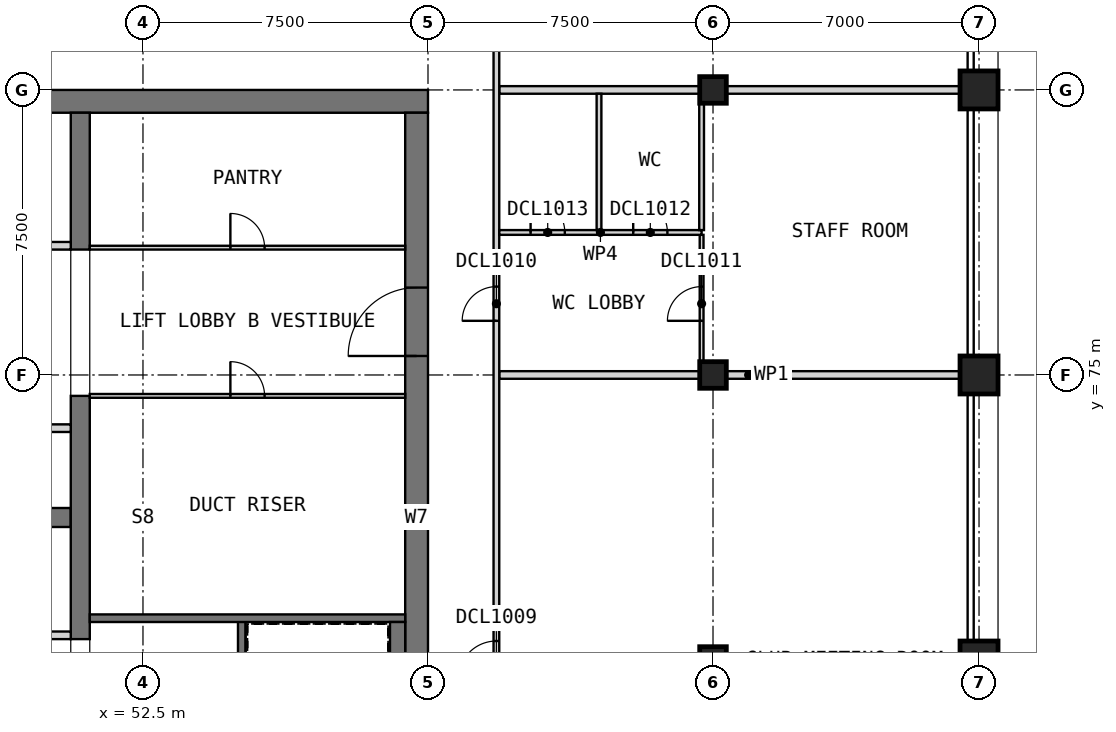
"""IFC4 building model, lengths in metres.
Left out: names, types, materials, properties, quantities, classifications, styles, units other than length and angle.
Written with IfcOpenShell. Run it as: python <this file> out.ifc"""

import sys

from ifc_helpers import new_model, si_unit, direction, frame, frame_2d, origin, origin_2d, place, context, subcontext, project, spatial, rectangle, extrude, element, fill, save


model = new_model("IFC4")
c1 = context("Model", 3, precision=1e-05, world=origin(), true_north=direction((0.0, 1.0)))
c2 = subcontext(c1, "Body", "Model", "MODEL_VIEW")
j1 = project(units=[si_unit("LENGTHUNIT", "METRE"), si_unit("PLANEANGLEUNIT", "RADIAN")], contexts=[c1])
p1 = place(None, origin())
s1 = spatial("IfcSite", under=j1, at=p1, CompositionType="ELEMENT")
p2 = place(p1, origin())
s2 = spatial("IfcBuilding", under=s1, at=p2, CompositionType="ELEMENT")
p3 = place(p2, frame((0.0, 0.0, 287.2)))
s3 = spatial("IfcBuildingStorey", under=s2, at=p3, CompositionType="ELEMENT", Elevation=287.2)
for number, where, z_axis, x_axis in (
    (1, (67.5, 67.5, 0.0), (0.0, 0.0, 1.0), (1.0, 0.0, 0.0)),
    (2, (67.5, 75.0, 0.0), (0.0, 0.0, 1.0), (1.0, 0.0, 0.0)),
    (3, (67.5, 82.5, 0.0), (0.0, 0.0, 1.0), (1.0, 0.0, 0.0)),
):
    element("IfcColumn", number, at=place(p3, frame(where, z_axis=z_axis, x_axis=x_axis)), inside=s3, PredefinedType="COLUMN", context=c2, shape_type="SweptSolid", body=[
        extrude(rectangle(XDim=0.7, YDim=0.7, at=origin_2d()), origin(), (0.0, 0.0, 1.0), 5.0),
    ])
for number, where, z_axis, x_axis in (
    (4, (74.5, 67.5, 0.0), (0.0, 0.0, 1.0), (1.0, 0.0, 0.0)),
    (5, (74.5, 75.0, 0.0), (0.0, 0.0, 1.0), (1.0, 0.0, 0.0)),
    (6, (74.5, 82.5, 0.0), (0.0, 0.0, 1.0), (1.0, 0.0, 0.0)),
):
    element("IfcColumn", number, at=place(p3, frame(where, z_axis=z_axis, x_axis=x_axis)), inside=s3, PredefinedType="COLUMN", context=c2, shape_type="SweptSolid", body=[
        extrude(rectangle(XDim=1.0, YDim=1.0, at=origin_2d()), origin(), (0.0, 0.0, 1.0), 5.0),
    ])
p4 = place(p3, frame((30.0, 82.2, 0.0), z_axis=(0.0, 0.0, 1.0), x_axis=(1.0, 0.0, 0.0)))
e7 = element("IfcWall", 7, at=p4, inside=s3, PredefinedType="SHEAR", context=c2, shape_type="SweptSolid", body=[
    extrude(rectangle(XDim=30.0, YDim=0.6, at=frame_2d((15.0, 0.0))), origin(), (0.0, 0.0, 1.0), 5.0),
])
p5 = place(p3, frame((59.7, 60.6, 0.0), z_axis=(0.0, 0.0, 1.0), x_axis=(0.0, 1.0, 0.0)))
e8 = element("IfcWall", 8, at=p5, inside=s3, PredefinedType="SHEAR", context=c2, shape_type="SweptSolid", body=[
    extrude(rectangle(XDim=21.3, YDim=0.6, at=frame_2d((10.65, 0.0))), origin(), (0.0, 0.0, 1.0), 5.0),
])
p6 = place(p5, frame((14.9, 0.0, 0.0)))
e9 = element("IfcOpeningElement", 9, at=p6, cuts=e8, PredefinedType="OPENING", context=c2, shape_type="SweptSolid", body=[
    extrude(rectangle(XDim=1.8, YDim=2.1, at=frame_2d((0.9, 1.05))), frame((0.0, 0.31, 0.0), z_axis=(0.0, -1.0, 0.0), x_axis=(1.0, 0.0, 0.0)), (0.0, 0.0, 1.0), 0.62),
])
p7 = place(p3, frame((35.0, 71.25, 0.0), z_axis=(0.0, 0.0, 1.0), x_axis=(1.0, 0.0, 0.0)))
e10 = element("IfcWall", 10, at=p7, inside=s3, PredefinedType="SHEAR", context=c2, shape_type="SweptSolid", body=[
    extrude(rectangle(XDim=15.6, YDim=0.5, at=frame_2d((7.8, 0.0))), origin(), (0.0, 0.0, 1.0), 5.0),
])
p8 = place(p3, frame((50.85, 68.05, 0.0), z_axis=(0.0, 0.0, 1.0), x_axis=(0.0, 1.0, 0.0)))
e11 = element("IfcWall", 11, at=p8, inside=s3, PredefinedType="SHEAR", context=c2, shape_type="SweptSolid", body=[
    extrude(rectangle(XDim=6.4, YDim=0.5, at=frame_2d((3.2, 0.0))), origin(), (0.0, 0.0, 1.0), 5.0),
])
p9 = place(p3, frame((50.85, 78.3, 0.0), z_axis=(0.0, 0.0, 1.0), x_axis=(0.0, 1.0, 0.0)))
e12 = element("IfcWall", 12, at=p9, inside=s3, PredefinedType="SHEAR", context=c2, shape_type="SweptSolid", body=[
    extrude(rectangle(XDim=3.6, YDim=0.5, at=frame_2d((1.8, 0.0))), origin(), (0.0, 0.0, 1.0), 5.0),
])
p10 = place(p3, frame((35.0, 68.15, 0.0), z_axis=(0.0, 0.0, 1.0), x_axis=(1.0, 0.0, 0.0)))
e13 = element("IfcWall", 13, at=p10, inside=s3, PredefinedType="PARTITIONING", context=c2, shape_type="SweptSolid", body=[
    extrude(rectangle(XDim=15.6, YDim=0.2, at=frame_2d((7.8, 0.0))), origin(), (0.0, 0.0, 1.0), 4.7),
])
p11 = place(p10, frame((2.15, 0.0, 0.0)))
e14 = element("IfcOpeningElement", 14, at=p11, cuts=e13, PredefinedType="OPENING", context=c2, shape_type="SweptSolid", body=[
    extrude(rectangle(XDim=0.9, YDim=2.1, at=frame_2d((0.45, 1.05))), frame((0.0, 0.11, 0.0), z_axis=(0.0, -1.0, 0.0), x_axis=(1.0, 0.0, 0.0)), (0.0, 0.0, 1.0), 0.22),
])
p12 = place(p10, frame((7.35, 0.0, 0.0)))
e15 = element("IfcOpeningElement", 15, at=p12, cuts=e13, PredefinedType="OPENING", context=c2, shape_type="SweptSolid", body=[
    extrude(rectangle(XDim=0.9, YDim=2.1, at=frame_2d((0.45, 1.05))), frame((0.0, 0.11, 0.0), z_axis=(0.0, -1.0, 0.0), x_axis=(1.0, 0.0, 0.0)), (0.0, 0.0, 1.0), 0.22),
])
p13 = place(p10, frame((12.55, 0.0, 0.0)))
e16 = element("IfcOpeningElement", 16, at=p13, cuts=e13, PredefinedType="OPENING", context=c2, shape_type="SweptSolid", body=[
    extrude(rectangle(XDim=0.9, YDim=2.1, at=frame_2d((0.45, 1.05))), frame((0.0, 0.11, 0.0), z_axis=(0.0, -1.0, 0.0), x_axis=(1.0, 0.0, 0.0)), (0.0, 0.0, 1.0), 0.22),
])
p14 = place(p3, frame((35.0, 73.6, 0.0), z_axis=(0.0, 0.0, 1.0), x_axis=(1.0, 0.0, 0.0)))
e17 = element("IfcWall", 17, at=p14, inside=s3, PredefinedType="SOLIDWALL", context=c2, shape_type="SweptSolid", body=[
    extrude(rectangle(XDim=15.6, YDim=0.2, at=frame_2d((7.8, 0.0))), origin(), (0.0, 0.0, 1.0), 5.0),
])
p15 = place(p14, frame((0.75, 0.0, 0.0)))
e18 = element("IfcOpeningElement", 18, at=p15, cuts=e17, PredefinedType="OPENING", context=c2, shape_type="SweptSolid", body=[
    extrude(rectangle(XDim=1.1, YDim=2.1, at=frame_2d((0.55, 1.05))), frame((0.0, 0.11, 0.0), z_axis=(0.0, -1.0, 0.0), x_axis=(1.0, 0.0, 0.0)), (0.0, 0.0, 1.0), 0.22),
])
p16 = place(p14, frame((3.35, 0.0, 0.0)))
e19 = element("IfcOpeningElement", 19, at=p16, cuts=e17, PredefinedType="OPENING", context=c2, shape_type="SweptSolid", body=[
    extrude(rectangle(XDim=1.1, YDim=2.1, at=frame_2d((0.55, 1.05))), frame((0.0, 0.11, 0.0), z_axis=(0.0, -1.0, 0.0), x_axis=(1.0, 0.0, 0.0)), (0.0, 0.0, 1.0), 0.22),
])
p17 = place(p14, frame((5.95, 0.0, 0.0)))
e20 = element("IfcOpeningElement", 20, at=p17, cuts=e17, PredefinedType="OPENING", context=c2, shape_type="SweptSolid", body=[
    extrude(rectangle(XDim=1.1, YDim=2.1, at=frame_2d((0.55, 1.05))), frame((0.0, 0.11, 0.0), z_axis=(0.0, -1.0, 0.0), x_axis=(1.0, 0.0, 0.0)), (0.0, 0.0, 1.0), 0.22),
])
p18 = place(p14, frame((8.55, 0.0, 0.0)))
e21 = element("IfcOpeningElement", 21, at=p18, cuts=e17, PredefinedType="OPENING", context=c2, shape_type="SweptSolid", body=[
    extrude(rectangle(XDim=1.1, YDim=2.1, at=frame_2d((0.55, 1.05))), frame((0.0, 0.11, 0.0), z_axis=(0.0, -1.0, 0.0), x_axis=(1.0, 0.0, 0.0)), (0.0, 0.0, 1.0), 0.22),
])
p19 = place(p14, frame((11.15, 0.0, 0.0)))
e22 = element("IfcOpeningElement", 22, at=p19, cuts=e17, PredefinedType="OPENING", context=c2, shape_type="SweptSolid", body=[
    extrude(rectangle(XDim=1.1, YDim=2.1, at=frame_2d((0.55, 1.05))), frame((0.0, 0.11, 0.0), z_axis=(0.0, -1.0, 0.0), x_axis=(1.0, 0.0, 0.0)), (0.0, 0.0, 1.0), 0.22),
])
p20 = place(p14, frame((13.75, 0.0, 0.0)))
e23 = element("IfcOpeningElement", 23, at=p20, cuts=e17, PredefinedType="OPENING", context=c2, shape_type="SweptSolid", body=[
    extrude(rectangle(XDim=1.1, YDim=2.1, at=frame_2d((0.55, 1.05))), frame((0.0, 0.11, 0.0), z_axis=(0.0, -1.0, 0.0), x_axis=(1.0, 0.0, 0.0)), (0.0, 0.0, 1.0), 0.22),
])
p21 = place(p3, frame((35.0, 78.4, 0.0), z_axis=(0.0, 0.0, 1.0), x_axis=(1.0, 0.0, 0.0)))
e24 = element("IfcWall", 24, at=p21, inside=s3, PredefinedType="SOLIDWALL", context=c2, shape_type="SweptSolid", body=[
    extrude(rectangle(XDim=15.6, YDim=0.2, at=frame_2d((7.8, 0.0))), origin(), (0.0, 0.0, 1.0), 5.0),
])
p22 = place(p21, frame((0.75, 0.0, 0.0)))
e25 = element("IfcOpeningElement", 25, at=p22, cuts=e24, PredefinedType="OPENING", context=c2, shape_type="SweptSolid", body=[
    extrude(rectangle(XDim=1.1, YDim=2.1, at=frame_2d((0.55, 1.05))), frame((0.0, 0.11, 0.0), z_axis=(0.0, -1.0, 0.0), x_axis=(1.0, 0.0, 0.0)), (0.0, 0.0, 1.0), 0.22),
])
p23 = place(p21, frame((3.35, 0.0, 0.0)))
e26 = element("IfcOpeningElement", 26, at=p23, cuts=e24, PredefinedType="OPENING", context=c2, shape_type="SweptSolid", body=[
    extrude(rectangle(XDim=1.1, YDim=2.1, at=frame_2d((0.55, 1.05))), frame((0.0, 0.11, 0.0), z_axis=(0.0, -1.0, 0.0), x_axis=(1.0, 0.0, 0.0)), (0.0, 0.0, 1.0), 0.22),
])
p24 = place(p21, frame((11.15, 0.0, 0.0)))
e27 = element("IfcOpeningElement", 27, at=p24, cuts=e24, PredefinedType="OPENING", context=c2, shape_type="SweptSolid", body=[
    extrude(rectangle(XDim=1.1, YDim=2.1, at=frame_2d((0.55, 1.05))), frame((0.0, 0.11, 0.0), z_axis=(0.0, -1.0, 0.0), x_axis=(1.0, 0.0, 0.0)), (0.0, 0.0, 1.0), 0.22),
])
p25 = place(p21, frame((13.75, 0.0, 0.0)))
e28 = element("IfcOpeningElement", 28, at=p25, cuts=e24, PredefinedType="OPENING", context=c2, shape_type="SweptSolid", body=[
    extrude(rectangle(XDim=1.1, YDim=2.1, at=frame_2d((0.55, 1.05))), frame((0.0, 0.11, 0.0), z_axis=(0.0, -1.0, 0.0), x_axis=(1.0, 0.0, 0.0)), (0.0, 0.0, 1.0), 0.22),
])
p26 = place(p3, frame((55.1, 60.6, 0.0), z_axis=(0.0, 0.0, 1.0), x_axis=(0.0, 1.0, 0.0)))
e29 = element("IfcWall", 29, at=p26, inside=s3, PredefinedType="SOLIDWALL", context=c2, shape_type="SweptSolid", body=[
    extrude(rectangle(XDim=8.0, YDim=0.2, at=frame_2d((4.0, 0.0))), origin(), (0.0, 0.0, 1.0), 4.7),
])
p27 = place(p3, frame((51.1, 68.6, 0.0), z_axis=(0.0, 0.0, 1.0), x_axis=(1.0, 0.0, 0.0)))
e30 = element("IfcWall", 30, at=p27, inside=s3, PredefinedType="SOLIDWALL", context=c2, shape_type="SweptSolid", body=[
    extrude(rectangle(XDim=8.3, YDim=0.2, at=frame_2d((4.15, 0.0))), origin(), (0.0, 0.0, 1.0), 4.7),
])
p28 = place(p3, frame((59.2, 60.6, 0.0), z_axis=(0.0, 0.0, 1.0), x_axis=(0.0, 1.0, 0.0)))
e31 = element("IfcWall", 31, at=p28, inside=s3, PredefinedType="SOLIDWALL", context=c2, shape_type="SweptSolid", body=[
    extrude(rectangle(XDim=7.9, YDim=0.4, at=frame_2d((3.95, 0.0))), origin(), (0.0, 0.0, 1.0), 4.7),
])
p29 = place(p3, frame((51.1, 74.45, 0.0), z_axis=(0.0, 0.0, 1.0), x_axis=(1.0, 0.0, 0.0)))
e32 = element("IfcWall", 32, at=p29, inside=s3, PredefinedType="PARTITIONING", context=c2, shape_type="SweptSolid", body=[
    extrude(rectangle(XDim=8.3, YDim=0.1, at=frame_2d((4.15, 0.0))), origin(), (0.0, 0.0, 1.0), 4.7),
])
p30 = place(p29, frame((3.7, 0.0, 0.0)))
e33 = element("IfcOpeningElement", 33, at=p30, cuts=e32, PredefinedType="OPENING", context=c2, shape_type="SweptSolid", body=[
    extrude(rectangle(XDim=0.9, YDim=2.1, at=frame_2d((0.45, 1.05))), frame((0.0, 0.06, 0.0), z_axis=(0.0, -1.0, 0.0), x_axis=(1.0, 0.0, 0.0)), (0.0, 0.0, 1.0), 0.12),
])
p31 = place(p3, frame((51.1, 78.35, 0.0), z_axis=(0.0, 0.0, 1.0), x_axis=(1.0, 0.0, 0.0)))
e34 = element("IfcWall", 34, at=p31, inside=s3, PredefinedType="PARTITIONING", context=c2, shape_type="SweptSolid", body=[
    extrude(rectangle(XDim=8.3, YDim=0.1, at=frame_2d((4.15, 0.0))), origin(), (0.0, 0.0, 1.0), 4.7),
])
p32 = place(p31, frame((3.7, 0.0, 0.0)))
e35 = element("IfcOpeningElement", 35, at=p32, cuts=e34, PredefinedType="OPENING", context=c2, shape_type="SweptSolid", body=[
    extrude(rectangle(XDim=0.9, YDim=2.1, at=frame_2d((0.45, 1.05))), frame((0.0, 0.06, 0.0), z_axis=(0.0, -1.0, 0.0), x_axis=(1.0, 0.0, 0.0)), (0.0, 0.0, 1.0), 0.12),
])
for number, where, z_axis, x_axis in (
    (36, (61.875, 75.0, 0.0), (0.0, 0.0, 1.0), (1.0, 0.0, 0.0)),
    (37, (61.875, 82.5, 0.0), (0.0, 0.0, 1.0), (1.0, 0.0, 0.0)),
):
    element("IfcWall", number, at=place(p3, frame(where, z_axis=z_axis, x_axis=x_axis)), inside=s3, PredefinedType="PARTITIONING", context=c2, shape_type="SweptSolid", body=[
        extrude(rectangle(XDim=13.125, YDim=0.2, at=frame_2d((6.562, 0.0))), origin(), (0.0, 0.0, 1.0), 4.7),
    ])
p33 = place(p3, frame((61.8, 58.275, 0.0), z_axis=(0.0, 0.0, 1.0), x_axis=(0.0, 1.0, 0.0)))
e38 = element("IfcWall", 38, at=p33, inside=s3, PredefinedType="PARTITIONING", context=c2, shape_type="SweptSolid", body=[
    extrude(rectangle(XDim=25.95, YDim=0.15, at=frame_2d((12.975, 0.0))), origin(), (0.0, 0.0, 1.0), 4.7),
])
p34 = place(p33, frame((8.725, 0.0, 0.0)))
e39 = element("IfcOpeningElement", 39, at=p34, cuts=e38, PredefinedType="OPENING", context=c2, shape_type="SweptSolid", body=[
    extrude(rectangle(XDim=1.0, YDim=2.1, at=frame_2d((0.5, 1.05))), frame((0.0, 0.085, 0.0), z_axis=(0.0, -1.0, 0.0), x_axis=(1.0, 0.0, 0.0)), (0.0, 0.0, 1.0), 0.17),
])
p35 = place(p33, frame((18.15, 0.0, 0.0)))
e40 = element("IfcOpeningElement", 40, at=p35, cuts=e38, PredefinedType="OPENING", context=c2, shape_type="SweptSolid", body=[
    extrude(rectangle(XDim=0.9, YDim=2.1, at=frame_2d((0.45, 1.05))), frame((0.0, 0.085, 0.0), z_axis=(0.0, -1.0, 0.0), x_axis=(1.0, 0.0, 0.0)), (0.0, 0.0, 1.0), 0.17),
])
p36 = place(p3, frame((67.2, 75.1, 0.0), z_axis=(0.0, 0.0, 1.0), x_axis=(0.0, 1.0, 0.0)))
e41 = element("IfcWall", 41, at=p36, inside=s3, PredefinedType="PARTITIONING", context=c2, shape_type="SweptSolid", body=[
    extrude(rectangle(XDim=3.587, YDim=0.1, at=frame_2d((1.794, 0.0))), origin(), (0.0, 0.0, 1.0), 4.7),
])
p37 = place(p36, frame((1.325, 0.0, 0.0)))
e42 = element("IfcOpeningElement", 42, at=p37, cuts=e41, PredefinedType="OPENING", context=c2, shape_type="SweptSolid", body=[
    extrude(rectangle(XDim=0.9, YDim=2.1, at=frame_2d((0.45, 1.05))), frame((0.0, 0.06, 0.0), z_axis=(0.0, -1.0, 0.0), x_axis=(1.0, 0.0, 0.0)), (0.0, 0.0, 1.0), 0.12),
])
p38 = place(p3, frame((61.875, 78.75, 0.0), z_axis=(0.0, 0.0, 1.0), x_axis=(1.0, 0.0, 0.0)))
e43 = element("IfcWall", 43, at=p38, inside=s3, PredefinedType="PARTITIONING", context=c2, shape_type="SweptSolid", body=[
    extrude(rectangle(XDim=5.325, YDim=0.125, at=frame_2d((2.663, 0.0))), origin(), (0.0, 0.0, 1.0), 4.7),
])
p39 = place(p38, frame((3.525, 0.0, 0.0)))
e44 = element("IfcOpeningElement", 44, at=p39, cuts=e43, PredefinedType="OPENING", context=c2, shape_type="SweptSolid", body=[
    extrude(rectangle(XDim=0.9, YDim=2.1, at=frame_2d((0.45, 1.05))), frame((0.0, 0.073, 0.0), z_axis=(0.0, -1.0, 0.0), x_axis=(1.0, 0.0, 0.0)), (0.0, 0.0, 1.0), 0.145),
])
p40 = place(p38, frame((0.825, 0.0, 0.0)))
e45 = element("IfcOpeningElement", 45, at=p40, cuts=e43, PredefinedType="OPENING", context=c2, shape_type="SweptSolid", body=[
    extrude(rectangle(XDim=0.9, YDim=2.1, at=frame_2d((0.45, 1.05))), frame((0.0, 0.073, 0.0), z_axis=(0.0, -1.0, 0.0), x_axis=(1.0, 0.0, 0.0)), (0.0, 0.0, 1.0), 0.145),
])
for number, where, z_axis, x_axis in (
    (46, (64.5, 78.812, 0.0), (0.0, 0.0, 1.0), (0.0, 1.0, 0.0)),
    (47, (67.2, 78.812, 0.0), (0.0, 0.0, 1.0), (0.0, 1.0, 0.0)),
):
    element("IfcWall", number, at=place(p3, frame(where, z_axis=z_axis, x_axis=x_axis)), inside=s3, PredefinedType="PARTITIONING", context=c2, shape_type="SweptSolid", body=[
        extrude(rectangle(XDim=3.587, YDim=0.125, at=frame_2d((1.794, 0.0))), origin(), (0.0, 0.0, 1.0), 4.7),
    ])
p41 = place(p6, origin())
e48 = element("IfcDoor", 48, at=p41, inside=s3, OperationType="DOUBLE_DOOR_SINGLE_SWING", PredefinedType="DOOR", context=c2, shape_type="SweptSolid", body=[
    extrude(rectangle(XDim=1.8, YDim=2.1, at=frame_2d((0.9, 1.05))), frame((0.0, 0.025, 0.0), z_axis=(0.0, -1.0, 0.0), x_axis=(1.0, 0.0, 0.0)), (0.0, 0.0, 1.0), 0.05),
])
fill(e9, e48)
p42 = place(p30, origin())
e49 = element("IfcDoor", 49, at=p42, inside=s3, OperationType="SINGLE_SWING_RIGHT", PredefinedType="DOOR", context=c2, shape_type="SweptSolid", body=[
    extrude(rectangle(XDim=0.9, YDim=2.1, at=frame_2d((0.45, 1.05))), frame((0.0, 0.025, 0.0), z_axis=(0.0, -1.0, 0.0), x_axis=(1.0, 0.0, 0.0)), (0.0, 0.0, 1.0), 0.05),
])
fill(e33, e49)
p43 = place(p32, origin())
e50 = element("IfcDoor", 50, at=p43, inside=s3, OperationType="SINGLE_SWING_RIGHT", PredefinedType="DOOR", context=c2, shape_type="SweptSolid", body=[
    extrude(rectangle(XDim=0.9, YDim=2.1, at=frame_2d((0.45, 1.05))), frame((0.0, 0.025, 0.0), z_axis=(0.0, -1.0, 0.0), x_axis=(1.0, 0.0, 0.0)), (0.0, 0.0, 1.0), 0.05),
])
fill(e35, e50)
p44 = place(p34, origin())
e51 = element("IfcDoor", 51, at=p44, inside=s3, OperationType="SINGLE_SWING_RIGHT", PredefinedType="DOOR", context=c2, shape_type="SweptSolid", body=[
    extrude(rectangle(XDim=1.0, YDim=2.1, at=frame_2d((0.5, 1.05))), frame((0.0, 0.025, 0.0), z_axis=(0.0, -1.0, 0.0), x_axis=(1.0, 0.0, 0.0)), (0.0, 0.0, 1.0), 0.05),
])
fill(e39, e51)
p45 = place(p35, origin())
e52 = element("IfcDoor", 52, at=p45, inside=s3, OperationType="SINGLE_SWING_RIGHT", PredefinedType="DOOR", context=c2, shape_type="SweptSolid", body=[
    extrude(rectangle(XDim=0.9, YDim=2.1, at=frame_2d((0.45, 1.05))), frame((0.0, 0.025, 0.0), z_axis=(0.0, -1.0, 0.0), x_axis=(1.0, 0.0, 0.0)), (0.0, 0.0, 1.0), 0.05),
])
fill(e40, e52)
p46 = place(p37, origin())
e53 = element("IfcDoor", 53, at=p46, inside=s3, OperationType="SINGLE_SWING_LEFT", PredefinedType="DOOR", context=c2, shape_type="SweptSolid", body=[
    extrude(rectangle(XDim=0.9, YDim=2.1, at=frame_2d((0.45, 1.05))), frame((0.0, 0.025, 0.0), z_axis=(0.0, -1.0, 0.0), x_axis=(1.0, 0.0, 0.0)), (0.0, 0.0, 1.0), 0.05),
])
fill(e42, e53)
p47 = place(p39, origin())
e54 = element("IfcDoor", 54, at=p47, inside=s3, OperationType="SINGLE_SWING_LEFT", PredefinedType="DOOR", context=c2, shape_type="SweptSolid", body=[
    extrude(rectangle(XDim=0.9, YDim=2.1, at=frame_2d((0.45, 1.05))), frame((0.0, 0.025, 0.0), z_axis=(0.0, -1.0, 0.0), x_axis=(1.0, 0.0, 0.0)), (0.0, 0.0, 1.0), 0.05),
])
fill(e44, e54)
p48 = place(p40, origin())
e55 = element("IfcDoor", 55, at=p48, inside=s3, OperationType="SINGLE_SWING_LEFT", PredefinedType="DOOR", context=c2, shape_type="SweptSolid", body=[
    extrude(rectangle(XDim=0.9, YDim=2.1, at=frame_2d((0.45, 1.05))), frame((0.0, 0.025, 0.0), z_axis=(0.0, -1.0, 0.0), x_axis=(1.0, 0.0, 0.0)), (0.0, 0.0, 1.0), 0.05),
])
fill(e45, e55)
save(model, sys.argv[1])
